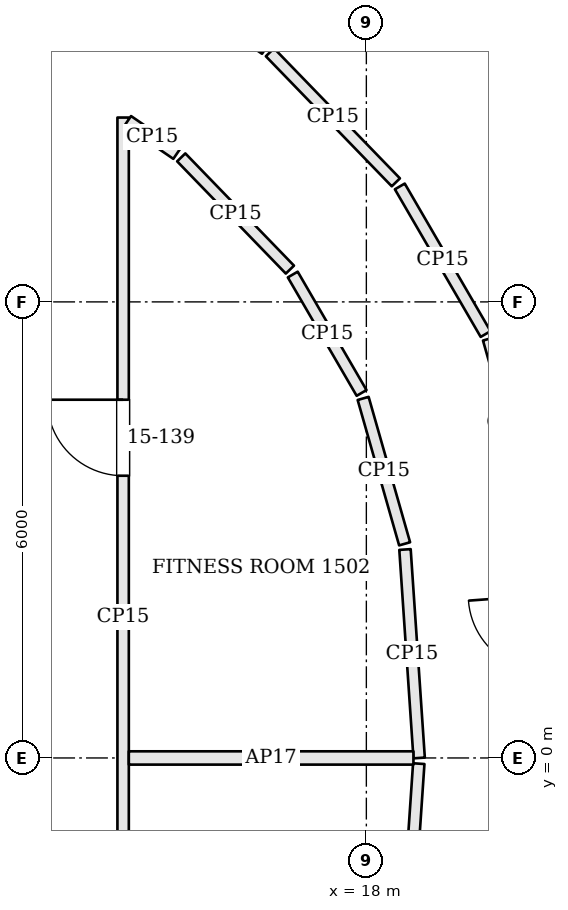
"""IFC4 building model, lengths in metres.
Left out: names, types, materials, properties, quantities, classifications, styles, units other than length and angle.
Written with IfcOpenShell. Run it as: python <this file> out.ifc"""

import sys

from ifc_helpers import new_model, si_unit, direction, frame, frame_2d, origin, place, context, subcontext, project, spatial, rectangle, extrude, element, fill, save


model = new_model("IFC4")
c1 = context("Model", 3, precision=1e-05, world=origin(), true_north=direction((0.0, 1.0)))
c2 = subcontext(c1, "Body", "Model", "MODEL_VIEW")
j1 = project(units=[si_unit("LENGTHUNIT", "METRE"), si_unit("PLANEANGLEUNIT", "RADIAN")], contexts=[c1])
p1 = place(None, origin())
s1 = spatial("IfcSite", under=j1, at=p1, CompositionType="ELEMENT")
p2 = place(p1, origin())
s2 = spatial("IfcBuilding", under=s1, at=p2, CompositionType="ELEMENT")
p3 = place(p2, frame((0.0, 0.0, 69.9)))
s3 = spatial("IfcBuildingStorey", under=s2, at=p3, CompositionType="ELEMENT", Elevation=69.9)
p4 = place(p3, frame((20.24, 3.289, 0.0), z_axis=(0.0, 0.0, 1.0), x_axis=(-0.27423295978, 0.961663290227, 0.0)))
e1 = element("IfcWall", 1, at=p4, inside=s3, PredefinedType="PARTITIONING", context=c2, shape_type="SweptSolid", body=[
    extrude(rectangle(XDim=2.312, YDim=0.15, at=frame_2d((1.156, 0.0))), origin(), (0.0, 0.0, 1.0), 2.68),
])
p5 = place(p3, frame((19.569, 5.577, 0.0), z_axis=(0.0, 0.0, 1.0), x_axis=(-0.502457989762, 0.864601624174, 0.0)))
e2 = element("IfcWall", 2, at=p5, inside=s3, PredefinedType="PARTITIONING", context=c2, shape_type="SweptSolid", body=[
    extrude(rectangle(XDim=2.246, YDim=0.15, at=frame_2d((1.123, 0.0))), origin(), (0.0, 0.0, 1.0), 2.68),
])
p6 = place(p3, frame((18.388, 7.573, 0.0), z_axis=(0.0, 0.0, 1.0), x_axis=(-0.695581958435, 0.718446754533, 0.0)))
e3 = element("IfcWall", 3, at=p6, inside=s3, PredefinedType="PARTITIONING", context=c2, shape_type="SweptSolid", body=[
    extrude(rectangle(XDim=2.381, YDim=0.15, at=frame_2d((1.19, 0.0))), origin(), (0.0, 0.0, 1.0), 2.68),
])
p7 = place(p3, frame((16.67, 9.326, 0.0), z_axis=(0.0, 0.0, 1.0), x_axis=(-0.824839356451, 0.565367169236, 0.0)))
e4 = element("IfcWall", 4, at=p7, inside=s3, PredefinedType="PARTITIONING", context=c2, shape_type="SweptSolid", body=[
    extrude(rectangle(XDim=2.267, YDim=0.15, at=frame_2d((1.133, 0.0))), origin(), (0.0, 0.0, 1.0), 2.68),
])
p8 = place(p3, frame((15.564, 7.901, 0.0), z_axis=(0.0, 0.0, 1.0), x_axis=(0.695611358841, -0.718418288639, 0.0)))
e5 = element("IfcWall", 5, at=p8, inside=s3, PredefinedType="PARTITIONING", context=c2, shape_type="SweptSolid", body=[
    extrude(rectangle(XDim=2.055, YDim=0.15, at=frame_2d((1.028, 0.0))), origin(), (0.0, 0.0, 1.0), 2.68),
])
p9 = place(p3, frame((17.032, 6.36, 0.0), z_axis=(0.0, 0.0, 1.0), x_axis=(0.502488551999, -0.864583862393, 0.0)))
e6 = element("IfcWall", 6, at=p9, inside=s3, PredefinedType="PARTITIONING", context=c2, shape_type="SweptSolid", body=[
    extrude(rectangle(XDim=1.802, YDim=0.15, at=frame_2d((0.901, 0.0))), origin(), (0.0, 0.0, 1.0), 2.68),
])
p10 = place(p3, frame((17.958, 4.73, 0.0), z_axis=(0.0, 0.0, 1.0), x_axis=(0.274315841816, -0.961639651288, 0.0)))
e7 = element("IfcWall", 7, at=p10, inside=s3, PredefinedType="PARTITIONING", context=c2, shape_type="SweptSolid", body=[
    extrude(rectangle(XDim=1.989, YDim=0.15, at=frame_2d((0.995, 0.0))), origin(), (0.0, 0.0, 1.0), 2.68),
])
p11 = place(p3, frame((18.508, 2.742, 0.0), z_axis=(0.0, 0.0, 1.0), x_axis=(0.067774714774, -0.997700650515, 0.0)))
e8 = element("IfcWall", 8, at=p11, inside=s3, PredefinedType="PARTITIONING", context=c2, shape_type="SweptSolid", body=[
    extrude(rectangle(XDim=2.749, YDim=0.15, at=frame_2d((1.374, 0.0))), origin(), (0.0, 0.0, 1.0), 2.68),
])
p12 = place(p3, frame((18.689, -0.075, 0.0), z_axis=(0.0, 0.0, 1.0), x_axis=(-0.067687508044, -0.997706570718, 0.0)))
e9 = element("IfcWall", 9, at=p12, inside=s3, PredefinedType="PARTITIONING", context=c2, shape_type="SweptSolid", body=[
    extrude(rectangle(XDim=2.676, YDim=0.15, at=frame_2d((1.338, 0.0))), origin(), (0.0, 0.0, 1.0), 2.68),
])
p13 = place(p3, frame((14.8, -4.725, 0.0), z_axis=(0.0, 0.0, 1.0), x_axis=(0.0, 1.0, 0.0)))
e10 = element("IfcWall", 10, at=p13, inside=s3, PredefinedType="PARTITIONING", context=c2, shape_type="SweptSolid", body=[
    extrude(rectangle(XDim=13.15, YDim=0.15, at=frame_2d((6.575, 0.0))), origin(), (0.0, 0.0, 1.0), 2.68),
])
p14 = place(p13, frame((8.438, 0.0, 0.0)))
e11 = element("IfcOpeningElement", 11, at=p14, cuts=e10, PredefinedType="OPENING", context=c2, shape_type="SweptSolid", body=[
    extrude(rectangle(XDim=1.0, YDim=2.1, at=frame_2d((0.5, 1.05))), frame((0.0, 0.085, 0.0), z_axis=(0.0, -1.0, 0.0), x_axis=(1.0, 0.0, 0.0)), (0.0, 0.0, 1.0), 0.17),
])
p15 = place(p3, frame((14.862, 8.383, 0.0), z_axis=(0.0, 0.0, 1.0), x_axis=(0.824875387239, -0.565314598721, 0.0)))
e12 = element("IfcWall", 12, at=p15, inside=s3, PredefinedType="PARTITIONING", context=c2, shape_type="SweptSolid", body=[
    extrude(rectangle(XDim=0.777, YDim=0.15, at=frame_2d((0.388, 0.0))), origin(), (0.0, 0.0, 1.0), 2.68),
])
p16 = place(p3, frame((14.875, 0.0, 0.0), z_axis=(0.0, 0.0, 1.0), x_axis=(1.0, 0.0, 0.0)))
e13 = element("IfcWall", 13, at=p16, inside=s3, PredefinedType="PARTITIONING", context=c2, shape_type="SweptSolid", body=[
    extrude(rectangle(XDim=3.744, YDim=0.175, at=frame_2d((1.872, 0.0))), origin(), (0.0, 0.0, 1.0), 2.68),
])
p17 = place(p14, origin())
e14 = element("IfcDoor", 14, at=p17, inside=s3, OperationType="SINGLE_SWING_RIGHT", PredefinedType="DOOR", context=c2, shape_type="SweptSolid", body=[
    extrude(rectangle(XDim=1.0, YDim=2.1, at=frame_2d((0.5, 1.05))), frame((0.0, 0.025, 0.0), z_axis=(0.0, -1.0, 0.0), x_axis=(1.0, 0.0, 0.0)), (0.0, 0.0, 1.0), 0.05),
])
fill(e11, e14)
save(model, sys.argv[1])
